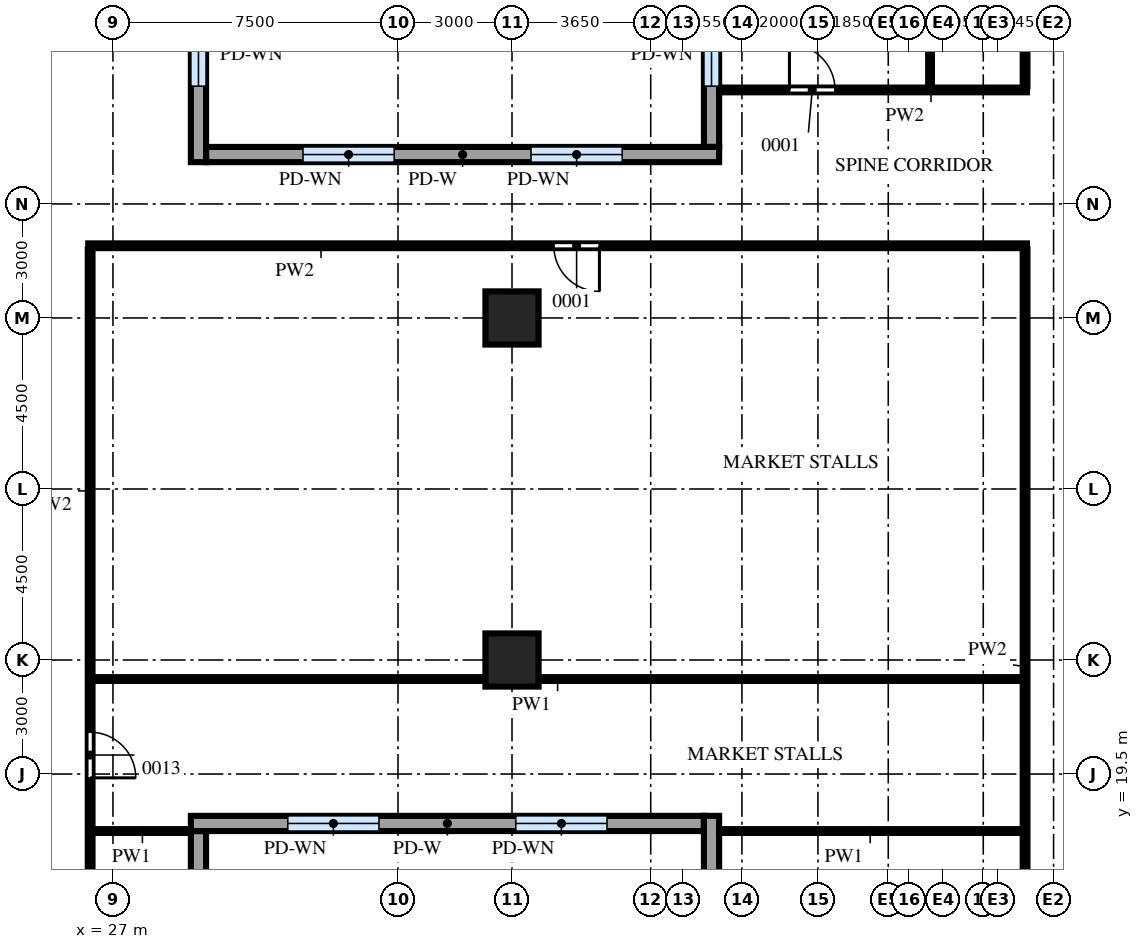
"""IFC4 building model, lengths in metres.
Left out: names, types, materials, properties, quantities, classifications, styles, units other than length and angle.
Written with IfcOpenShell. Run it as: python <this file> out.ifc"""

import sys

from ifc_helpers import new_model, si_unit, direction, frame, frame_2d, origin, origin_2d, place, context, subcontext, project, spatial, rectangle, extrude, source, transform, mapped, element, fill, save


model = new_model("IFC4")
c1 = context("Model", 3, precision=1e-05, world=origin(), true_north=direction((0.0, 1.0)))
c2 = subcontext(c1, "Body", "Model", "MODEL_VIEW")
j1 = project(units=[si_unit("LENGTHUNIT", "METRE"), si_unit("PLANEANGLEUNIT", "RADIAN")], contexts=[c1])
p1 = place(None, origin())
s1 = spatial("IfcSite", under=j1, at=p1, CompositionType="ELEMENT")
p2 = place(p1, origin())
s2 = spatial("IfcBuilding", under=s1, at=p2, CompositionType="ELEMENT")
p3 = place(p2, frame((0.0, 0.0, 7.5)))
s3 = spatial("IfcBuildingStorey", under=s2, at=p3, CompositionType="ELEMENT", Elevation=7.5)
m1 = source(origin(), c2, "Body", "SweptSolid", [
    extrude(rectangle(XDim=1.4, YDim=1.4, at=origin_2d()), origin(), (0.0, 0.0, 1.0), 5.2),
])
for number, where, z_axis, x_axis in (
    (1, (37.5, 22.5, 0.0), (0.0, 0.0, 1.0), (1.0, 0.0, 0.0)),
    (2, (37.5, 31.5, 0.0), (0.0, 0.0, 1.0), (1.0, 0.0, 0.0)),
):
    element("IfcColumn", number, at=place(p3, frame(where, z_axis=z_axis, x_axis=x_axis)), inside=s3, PredefinedType="COLUMN", context=c2, shape_type="MappedRepresentation", body=[
        mapped(m1, transform((0.0, 0.0, 0.0))),
    ])
m2 = source(origin(), c2, "Body", "SweptSolid", [
    extrude(rectangle(XDim=17.6, YDim=0.4, at=frame_2d((8.8, 0.0))), origin(), (0.0, 0.0, 1.0), 5.2),
])
p4 = place(p3, frame((29.25, 0.4, 0.0), z_axis=(0.0, 0.0, 1.0), x_axis=(0.0, 1.0, 0.0)))
e3 = element("IfcWall", 3, at=p4, inside=s3, PredefinedType="SOLIDWALL", context=c2, shape_type="MappedRepresentation", body=[
    mapped(m2, transform((0.0, 0.0, 0.0))),
])
m3 = source(origin(), c2, "Body", "SweptSolid", [
    extrude(rectangle(XDim=2.4, YDim=2.4, at=frame_2d((1.2, 1.2))), frame((0.0, 0.21, 0.0), z_axis=(0.0, -1.0, 0.0), x_axis=(1.0, 0.0, 0.0)), (0.0, 0.0, 1.0), 0.42),
])
p5 = place(p4, frame((1.6, 0.0, 1.0)))
e4 = element("IfcOpeningElement", 4, at=p5, cuts=e3, PredefinedType="OPENING", context=c2, shape_type="MappedRepresentation", body=[
    mapped(m3, transform((0.0, 0.0, 0.0))),
])
p6 = place(p4, frame((7.6, 0.0, 1.0)))
e5 = element("IfcOpeningElement", 5, at=p6, cuts=e3, PredefinedType="OPENING", context=c2, shape_type="MappedRepresentation", body=[
    mapped(m3, transform((0.0, 0.0, 0.0))),
])
p7 = place(p4, frame((13.6, 0.0, 1.0)))
e6 = element("IfcOpeningElement", 6, at=p7, cuts=e3, PredefinedType="OPENING", context=c2, shape_type="MappedRepresentation", body=[
    mapped(m3, transform((0.0, 0.0, 0.0))),
])
m4 = source(origin(), c2, "Body", "SweptSolid", [
    extrude(rectangle(XDim=13.5, YDim=0.4, at=frame_2d((6.75, 0.0))), origin(), (0.0, 0.0, 1.0), 5.2),
])
p8 = place(p3, frame((29.05, 18.2, 0.0), z_axis=(0.0, 0.0, 1.0), x_axis=(1.0, 0.0, 0.0)))
e7 = element("IfcWall", 7, at=p8, inside=s3, PredefinedType="SOLIDWALL", context=c2, shape_type="MappedRepresentation", body=[
    mapped(m4, transform((0.0, 0.0, 0.0))),
])
p9 = place(p8, frame((2.55, 0.0, 1.0)))
e8 = element("IfcOpeningElement", 8, at=p9, cuts=e7, PredefinedType="OPENING", context=c2, shape_type="MappedRepresentation", body=[
    mapped(m3, transform((0.0, 0.0, 0.0))),
])
p10 = place(p8, frame((8.55, 0.0, 1.0)))
e9 = element("IfcOpeningElement", 9, at=p10, cuts=e7, PredefinedType="OPENING", context=c2, shape_type="MappedRepresentation", body=[
    mapped(m3, transform((0.0, 0.0, 0.0))),
])
m5 = source(origin(), c2, "Body", "SweptSolid", [
    extrude(rectangle(XDim=18.4, YDim=0.4, at=frame_2d((9.2, 0.0))), origin(), (0.0, 0.0, 1.0), 5.2),
])
p11 = place(p3, frame((42.75, 18.4, 0.0), z_axis=(0.0, 0.0, 1.0), x_axis=(0.0, -1.0, 0.0)))
e10 = element("IfcWall", 10, at=p11, inside=s3, PredefinedType="SOLIDWALL", context=c2, shape_type="MappedRepresentation", body=[
    mapped(m5, transform((0.0, 0.0, 0.0))),
])
p12 = place(p11, frame((2.0, 0.0, 1.0)))
e11 = element("IfcOpeningElement", 11, at=p12, cuts=e10, PredefinedType="OPENING", context=c2, shape_type="MappedRepresentation", body=[
    mapped(m3, transform((0.0, 0.0, 0.0))),
])
p13 = place(p11, frame((8.0, 0.0, 1.0)))
e12 = element("IfcOpeningElement", 12, at=p13, cuts=e10, PredefinedType="OPENING", context=c2, shape_type="MappedRepresentation", body=[
    mapped(m3, transform((0.0, 0.0, 0.0))),
])
p14 = place(p11, frame((14.0, 0.0, 1.0)))
e13 = element("IfcOpeningElement", 13, at=p14, cuts=e10, PredefinedType="OPENING", context=c2, shape_type="MappedRepresentation", body=[
    mapped(m3, transform((0.0, 0.0, 0.0))),
])
p15 = place(p3, frame((42.75, 53.6, 0.0), z_axis=(0.0, 0.0, 1.0), x_axis=(0.0, -1.0, 0.0)))
e14 = element("IfcWall", 14, at=p15, inside=s3, PredefinedType="SOLIDWALL", context=c2, shape_type="MappedRepresentation", body=[
    mapped(m2, transform((0.0, 0.0, 0.0))),
])
p16 = place(p15, frame((1.6, 0.0, 1.0)))
e15 = element("IfcOpeningElement", 15, at=p16, cuts=e14, PredefinedType="OPENING", context=c2, shape_type="MappedRepresentation", body=[
    mapped(m3, transform((0.0, 0.0, 0.0))),
])
p17 = place(p15, frame((7.6, 0.0, 1.0)))
e16 = element("IfcOpeningElement", 16, at=p17, cuts=e14, PredefinedType="OPENING", context=c2, shape_type="MappedRepresentation", body=[
    mapped(m3, transform((0.0, 0.0, 0.0))),
])
p18 = place(p15, frame((13.6, 0.0, 1.0)))
e17 = element("IfcOpeningElement", 17, at=p18, cuts=e14, PredefinedType="OPENING", context=c2, shape_type="MappedRepresentation", body=[
    mapped(m3, transform((0.0, 0.0, 0.0))),
])
p19 = place(p3, frame((42.95, 35.8, 0.0), z_axis=(0.0, 0.0, 1.0), x_axis=(-1.0, 0.0, 0.0)))
e18 = element("IfcWall", 18, at=p19, inside=s3, PredefinedType="SOLIDWALL", context=c2, shape_type="MappedRepresentation", body=[
    mapped(m4, transform((0.0, 0.0, 0.0))),
])
p20 = place(p19, frame((2.55, 0.0, 1.0)))
e19 = element("IfcOpeningElement", 19, at=p20, cuts=e18, PredefinedType="OPENING", context=c2, shape_type="MappedRepresentation", body=[
    mapped(m3, transform((0.0, 0.0, 0.0))),
])
p21 = place(p19, frame((8.55, 0.0, 1.0)))
e20 = element("IfcOpeningElement", 20, at=p21, cuts=e18, PredefinedType="OPENING", context=c2, shape_type="MappedRepresentation", body=[
    mapped(m3, transform((0.0, 0.0, 0.0))),
])
p22 = place(p3, frame((29.25, 35.6, 0.0), z_axis=(0.0, 0.0, 1.0), x_axis=(0.0, 1.0, 0.0)))
e21 = element("IfcWall", 21, at=p22, inside=s3, PredefinedType="SOLIDWALL", context=c2, shape_type="MappedRepresentation", body=[
    mapped(m5, transform((0.0, 0.0, 0.0))),
])
p23 = place(p22, frame((2.0, 0.0, 1.0)))
e22 = element("IfcOpeningElement", 22, at=p23, cuts=e21, PredefinedType="OPENING", context=c2, shape_type="MappedRepresentation", body=[
    mapped(m3, transform((0.0, 0.0, 0.0))),
])
p24 = place(p22, frame((8.0, 0.0, 1.0)))
e23 = element("IfcOpeningElement", 23, at=p24, cuts=e21, PredefinedType="OPENING", context=c2, shape_type="MappedRepresentation", body=[
    mapped(m3, transform((0.0, 0.0, 0.0))),
])
p25 = place(p22, frame((14.0, 0.0, 1.0)))
e24 = element("IfcOpeningElement", 24, at=p25, cuts=e21, PredefinedType="OPENING", context=c2, shape_type="MappedRepresentation", body=[
    mapped(m3, transform((0.0, 0.0, 0.0))),
])
m6 = source(origin(), c2, "Body", "SweptSolid", [
    extrude(rectangle(XDim=29.7, YDim=0.125, at=frame_2d((14.85, 0.0))), origin(), (0.0, 0.0, 1.0), 5.2),
])
p26 = place(p3, frame((51.0, 3.6, 0.0), z_axis=(0.0, 0.0, 1.0), x_axis=(0.0, 1.0, 0.0)))
e25 = element("IfcWall", 25, at=p26, inside=s3, PredefinedType="PARTITIONING", context=c2, shape_type="MappedRepresentation", body=[
    mapped(m6, transform((0.0, 0.0, 0.0))),
])
m7 = source(origin(), c2, "Body", "SweptSolid", [
    extrude(rectangle(XDim=1.2, YDim=2.1, at=frame_2d((0.6, 1.05))), frame((0.0, 0.073, 0.0), z_axis=(0.0, -1.0, 0.0), x_axis=(1.0, 0.0, 0.0)), (0.0, 0.0, 1.0), 0.145),
])
p27 = place(p26, frame((6.55, 0.0, 0.0)))
e26 = element("IfcOpeningElement", 26, at=p27, cuts=e25, PredefinedType="OPENING", context=c2, shape_type="MappedRepresentation", body=[
    mapped(m7, transform((0.0, 0.0, 0.0))),
])
m8 = source(origin(), c2, "Body", "SweptSolid", [
    extrude(rectangle(XDim=27.15, YDim=0.125, at=frame_2d((13.575, 0.0))), origin(), (0.0, 0.0, 1.0), 5.2),
])
p28 = place(p3, frame((26.4, 6.15, 0.0), z_axis=(0.0, 0.0, 1.0), x_axis=(0.0, 1.0, 0.0)))
e27 = element("IfcWall", 27, at=p28, inside=s3, PredefinedType="PARTITIONING", context=c2, shape_type="MappedRepresentation", body=[
    mapped(m8, transform((0.0, 0.0, 0.0))),
])
m9 = source(origin(), c2, "Body", "SweptSolid", [
    extrude(rectangle(XDim=0.9, YDim=2.1, at=frame_2d((0.45, 1.05))), frame((0.0, 0.073, 0.0), z_axis=(0.0, -1.0, 0.0), x_axis=(1.0, 0.0, 0.0)), (0.0, 0.0, 1.0), 0.145),
])
p29 = place(p28, frame((5.3, 0.0, 0.0)))
e28 = element("IfcOpeningElement", 28, at=p29, cuts=e27, PredefinedType="OPENING", context=c2, shape_type="MappedRepresentation", body=[
    mapped(m9, transform((0.0, 0.0, 0.0))),
])
p30 = place(p28, frame((13.25, 0.0, 0.0)))
e29 = element("IfcOpeningElement", 29, at=p30, cuts=e27, PredefinedType="OPENING", context=c2, shape_type="MappedRepresentation", body=[
    mapped(m7, transform((0.0, 0.0, 0.0))),
])
m10 = source(origin(), c2, "Body", "SweptSolid", [
    extrude(rectangle(XDim=2.55, YDim=0.1, at=frame_2d((1.275, 0.0))), origin(), (0.0, 0.0, 1.0), 5.2),
])
p31 = place(p3, frame((26.5, 18.0, 0.0), z_axis=(0.0, 0.0, 1.0), x_axis=(1.0, 0.0, 0.0)))
e30 = element("IfcWall", 30, at=p31, inside=s3, PredefinedType="PARTITIONING", context=c2, shape_type="MappedRepresentation", body=[
    mapped(m10, transform((0.0, 0.0, 0.0))),
])
m11 = source(origin(), c2, "Body", "SweptSolid", [
    extrude(rectangle(XDim=7.95, YDim=0.1, at=frame_2d((3.975, 0.0))), origin(), (0.0, 0.0, 1.0), 5.2),
])
p32 = place(p3, frame((42.95, 18.0, 0.0), z_axis=(0.0, 0.0, 1.0), x_axis=(1.0, 0.0, 0.0)))
e31 = element("IfcWall", 31, at=p32, inside=s3, PredefinedType="PARTITIONING", context=c2, shape_type="MappedRepresentation", body=[
    mapped(m11, transform((0.0, 0.0, 0.0))),
])
m12 = source(origin(), c2, "Body", "SweptSolid", [
    extrude(rectangle(XDim=24.4, YDim=0.1, at=frame_2d((12.2, 0.0))), origin(), (0.0, 0.0, 1.0), 5.2),
])
p33 = place(p3, frame((26.5, 22.0, 0.0), z_axis=(0.0, 0.0, 1.0), x_axis=(1.0, 0.0, 0.0)))
e32 = element("IfcWall", 32, at=p33, inside=s3, PredefinedType="PARTITIONING", context=c2, shape_type="MappedRepresentation", body=[
    mapped(m12, transform((0.0, 0.0, 0.0))),
])
m13 = source(origin(), c2, "Body", "SweptSolid", [
    extrude(rectangle(XDim=24.7, YDim=0.125, at=frame_2d((12.35, 0.0))), origin(), (0.0, 0.0, 1.0), 5.2),
])
p34 = place(p3, frame((26.35, 33.4, 0.0), z_axis=(0.0, 0.0, 1.0), x_axis=(1.0, 0.0, 0.0)))
e33 = element("IfcWall", 33, at=p34, inside=s3, PredefinedType="PARTITIONING", context=c2, shape_type="MappedRepresentation", body=[
    mapped(m13, transform((0.0, 0.0, 0.0))),
])
p35 = place(p34, frame((12.25, 0.0, 0.0)))
e34 = element("IfcOpeningElement", 34, at=p35, cuts=e33, PredefinedType="OPENING", context=c2, shape_type="MappedRepresentation", body=[
    mapped(m7, transform((0.0, 0.0, 0.0))),
])
m14 = source(origin(), c2, "Body", "SweptSolid", [
    extrude(rectangle(XDim=8.1, YDim=0.125, at=frame_2d((4.05, 0.0))), origin(), (0.0, 0.0, 1.0), 5.2),
])
p36 = place(p3, frame((42.95, 37.5, 0.0), z_axis=(0.0, 0.0, 1.0), x_axis=(1.0, 0.0, 0.0)))
e35 = element("IfcWall", 35, at=p36, inside=s3, PredefinedType="PARTITIONING", context=c2, shape_type="MappedRepresentation", body=[
    mapped(m14, transform((0.0, 0.0, 0.0))),
])
p37 = place(p36, frame((1.85, 0.0, 0.0)))
e36 = element("IfcOpeningElement", 36, at=p37, cuts=e35, PredefinedType="OPENING", context=c2, shape_type="MappedRepresentation", body=[
    mapped(m7, transform((0.0, 0.0, 0.0))),
])
m15 = source(origin(), c2, "Body", "SweptSolid", [
    extrude(rectangle(XDim=16.0, YDim=0.1, at=frame_2d((8.0, 0.0))), origin(), (0.0, 0.0, 1.0), 5.2),
])
p38 = place(p3, frame((48.5, 37.6, 0.0), z_axis=(0.0, 0.0, 1.0), x_axis=(0.0, 1.0, 0.0)))
e37 = element("IfcWall", 37, at=p38, inside=s3, PredefinedType="PARTITIONING", context=c2, shape_type="MappedRepresentation", body=[
    mapped(m15, transform((0.0, 0.0, 0.0))),
])
m16 = source(origin(), c2, "Body", "SweptSolid", [
    extrude(rectangle(XDim=12.9, YDim=0.125, at=frame_2d((6.45, 0.0))), origin(), (0.0, 0.0, 1.0), 5.2),
])
p39 = place(p3, frame((51.0, 37.6, 0.0), z_axis=(0.0, 0.0, 1.0), x_axis=(0.0, 1.0, 0.0)))
e38 = element("IfcWall", 38, at=p39, inside=s3, PredefinedType="PARTITIONING", context=c2, shape_type="MappedRepresentation", body=[
    mapped(m16, transform((0.0, 0.0, 0.0))),
])
p40 = place(p39, frame((5.85, 0.0, 0.0)))
e39 = element("IfcOpeningElement", 39, at=p40, cuts=e38, PredefinedType="OPENING", context=c2, shape_type="MappedRepresentation", body=[
    mapped(m9, transform((0.0, 0.0, 0.0))),
])
m17 = source(origin(), c2, "Body", "SweptSolid", [
    extrude(rectangle(XDim=2.4, YDim=2.4, at=frame_2d((1.2, 1.2))), frame((0.0, 0.03, 0.0), z_axis=(0.0, -1.0, 0.0), x_axis=(1.0, 0.0, 0.0)), (0.0, 0.0, 1.0), 0.06),
])
p41 = place(p9, origin())
e40 = element("IfcWindow", 40, at=p41, inside=s3, PartitioningType="SINGLE_PANEL", PredefinedType="WINDOW", context=c2, shape_type="MappedRepresentation", body=[
    mapped(m17, transform((0.0, 0.0, 0.0))),
])
fill(e8, e40)
p42 = place(p10, origin())
e41 = element("IfcWindow", 41, at=p42, inside=s3, PartitioningType="SINGLE_PANEL", PredefinedType="WINDOW", context=c2, shape_type="MappedRepresentation", body=[
    mapped(m17, transform((0.0, 0.0, 0.0))),
])
fill(e9, e41)
p43 = place(p18, origin())
e42 = element("IfcWindow", 42, at=p43, inside=s3, PartitioningType="SINGLE_PANEL", PredefinedType="WINDOW", context=c2, shape_type="MappedRepresentation", body=[
    mapped(m17, transform((0.0, 0.0, 0.0))),
])
fill(e17, e42)
p44 = place(p20, origin())
e43 = element("IfcWindow", 43, at=p44, inside=s3, PartitioningType="SINGLE_PANEL", PredefinedType="WINDOW", context=c2, shape_type="MappedRepresentation", body=[
    mapped(m17, transform((0.0, 0.0, 0.0))),
])
fill(e19, e43)
p45 = place(p21, origin())
e44 = element("IfcWindow", 44, at=p45, inside=s3, PartitioningType="SINGLE_PANEL", PredefinedType="WINDOW", context=c2, shape_type="MappedRepresentation", body=[
    mapped(m17, transform((0.0, 0.0, 0.0))),
])
fill(e20, e44)
p46 = place(p23, origin())
e45 = element("IfcWindow", 45, at=p46, inside=s3, PartitioningType="SINGLE_PANEL", PredefinedType="WINDOW", context=c2, shape_type="MappedRepresentation", body=[
    mapped(m17, transform((0.0, 0.0, 0.0))),
])
fill(e22, e45)
m18 = source(origin(), c2, "Body", "SweptSolid", [
    extrude(rectangle(XDim=1.2, YDim=2.1, at=frame_2d((0.6, 1.05))), frame((0.0, 0.025, 0.0), z_axis=(0.0, -1.0, 0.0), x_axis=(1.0, 0.0, 0.0)), (0.0, 0.0, 1.0), 0.05),
])
p47 = place(p30, origin())
e46 = element("IfcDoor", 46, at=p47, inside=s3, OperationType="SINGLE_SWING_LEFT", PredefinedType="DOOR", context=c2, shape_type="MappedRepresentation", body=[
    mapped(m18, transform((0.0, 0.0, 0.0))),
])
fill(e29, e46)
p48 = place(p35, origin())
e47 = element("IfcDoor", 47, at=p48, inside=s3, OperationType="SINGLE_SWING_RIGHT", PredefinedType="DOOR", context=c2, shape_type="MappedRepresentation", body=[
    mapped(m18, transform((0.0, 0.0, 0.0))),
])
fill(e34, e47)
p49 = place(p37, origin())
e48 = element("IfcDoor", 48, at=p49, inside=s3, OperationType="SINGLE_SWING_RIGHT", PredefinedType="DOOR", context=c2, shape_type="MappedRepresentation", body=[
    mapped(m18, transform((0.0, 0.0, 0.0))),
])
fill(e36, e48)
save(model, sys.argv[1])
